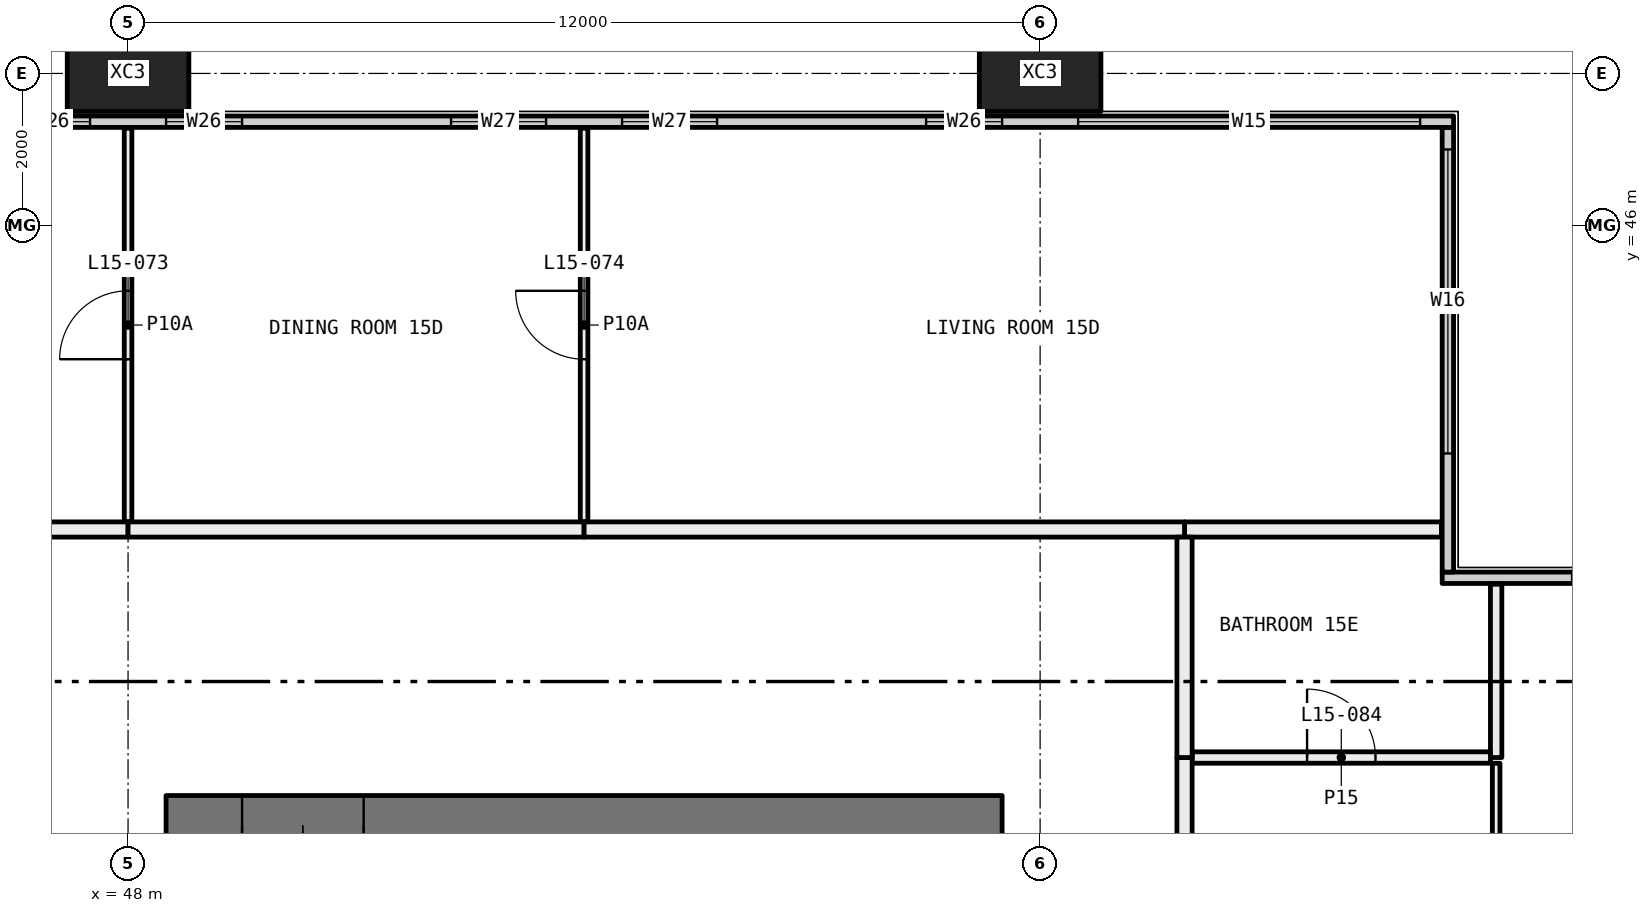
"""IFC4 building model, lengths in metres.
Left out: names, types, materials, properties, quantities, classifications, styles, units other than length and angle.
Written with IfcOpenShell. Run it as: python <this file> out.ifc"""

import sys

from ifc_helpers import new_model, si_unit, direction, frame, frame_2d, origin, origin_2d, place, context, subcontext, project, spatial, rectangle, hollow_rectangle, extrude, element, fill, save


model = new_model("IFC4")
c1 = context("Model", 3, precision=1e-05, world=origin(), true_north=direction((0.0, 1.0)))
c2 = subcontext(c1, "Body", "Model", "MODEL_VIEW")
j1 = project(units=[si_unit("LENGTHUNIT", "METRE"), si_unit("PLANEANGLEUNIT", "RADIAN")], contexts=[c1])
p1 = place(None, origin())
s1 = spatial("IfcSite", under=j1, at=p1, CompositionType="ELEMENT")
p2 = place(p1, origin())
s2 = spatial("IfcBuilding", under=s1, at=p2, CompositionType="ELEMENT")
p3 = place(p2, frame((0.0, 0.0, 64.5)))
s3 = spatial("IfcBuildingStorey", under=s2, at=p3, CompositionType="ELEMENT", Elevation=64.5)
for number, where, z_axis, x_axis in (
    (1, (48.0, 48.0, -0.4), (0.0, 0.0, 1.0), (1.0, 0.0, 0.0)),
    (2, (60.0, 48.0, -0.4), (0.0, 0.0, 1.0), (1.0, 0.0, 0.0)),
):
    element("IfcColumn", number, at=place(p3, frame(where, z_axis=z_axis, x_axis=x_axis)), inside=s3, PredefinedType="COLUMN", context=c2, shape_type="SweptSolid", body=[
        extrude(hollow_rectangle(XDim=1.6, YDim=1.0, WallThickness=0.065, at=origin_2d()), origin(), (0.0, 0.0, 1.0), 3.45),
    ])
p4 = place(p3, frame((65.29, 41.365, 0.0), z_axis=(0.0, 0.0, 1.0), x_axis=(1.0, 0.0, 0.0)))
e3 = element("IfcWall", 3, at=p4, inside=s3, PredefinedType="ELEMENTEDWALL", context=c2, shape_type="SweptSolid", body=[
    extrude(rectangle(XDim=6.15, YDim=0.15, at=frame_2d((3.075, 0.0))), origin(), (0.0, 0.0, 1.0), 3.05),
])
p5 = place(p4, frame((1.71, 0.0, 0.45)))
e4 = element("IfcOpeningElement", 4, at=p5, cuts=e3, PredefinedType="OPENING", context=c2, shape_type="SweptSolid", body=[
    extrude(rectangle(XDim=4.0, YDim=2.55, at=frame_2d((2.0, 1.275))), frame((0.0, 0.085, 0.0), z_axis=(0.0, -1.0, 0.0), x_axis=(1.0, 0.0, 0.0)), (0.0, 0.0, 1.0), 0.17),
])
p6 = place(p3, frame((65.365, 41.44, 0.0), z_axis=(0.0, 0.0, 1.0), x_axis=(0.0, 1.0, 0.0)))
e5 = element("IfcWall", 5, at=p6, inside=s3, PredefinedType="ELEMENTEDWALL", context=c2, shape_type="SweptSolid", body=[
    extrude(rectangle(XDim=5.85, YDim=0.15, at=frame_2d((2.925, 0.0))), origin(), (0.0, 0.0, 1.0), 3.05),
])
p7 = place(p6, frame((1.56, 0.0, 0.45)))
e6 = element("IfcOpeningElement", 6, at=p7, cuts=e5, PredefinedType="OPENING", context=c2, shape_type="SweptSolid", body=[
    extrude(rectangle(XDim=4.0, YDim=2.55, at=frame_2d((2.0, 1.275))), frame((0.0, 0.085, 0.0), z_axis=(0.0, -1.0, 0.0), x_axis=(1.0, 0.0, 0.0)), (0.0, 0.0, 1.0), 0.17),
])
p8 = place(p3, frame((6.56, 47.365, 0.0), z_axis=(0.0, 0.0, 1.0), x_axis=(1.0, 0.0, 0.0)))
e7 = element("IfcWall", 7, at=p8, inside=s3, PredefinedType="ELEMENTEDWALL", context=c2, shape_type="SweptSolid", body=[
    extrude(rectangle(XDim=58.88, YDim=0.15, at=frame_2d((29.44, 0.0))), origin(), (0.0, 0.0, 1.0), 3.05),
])
p9 = place(p8, frame((0.44, 0.0, 0.45)))
e8 = element("IfcOpeningElement", 8, at=p9, cuts=e7, PredefinedType="OPENING", context=c2, shape_type="SweptSolid", body=[
    extrude(rectangle(XDim=4.5, YDim=2.55, at=frame_2d((2.25, 1.275))), frame((0.0, 0.085, 0.0), z_axis=(0.0, -1.0, 0.0), x_axis=(1.0, 0.0, 0.0)), (0.0, 0.0, 1.0), 0.17),
])
p10 = place(p8, frame((5.94, 0.0, 0.45)))
e9 = element("IfcOpeningElement", 9, at=p10, cuts=e7, PredefinedType="OPENING", context=c2, shape_type="SweptSolid", body=[
    extrude(rectangle(XDim=1.0, YDim=2.55, at=frame_2d((0.5, 1.275))), frame((0.0, 0.085, 0.0), z_axis=(0.0, -1.0, 0.0), x_axis=(1.0, 0.0, 0.0)), (0.0, 0.0, 1.0), 0.17),
])
p11 = place(p8, frame((9.69, 0.0, 0.45)))
e10 = element("IfcOpeningElement", 10, at=p11, cuts=e7, PredefinedType="OPENING", context=c2, shape_type="SweptSolid", body=[
    extrude(rectangle(XDim=1.25, YDim=2.55, at=frame_2d((0.625, 1.275))), frame((0.0, 0.085, 0.0), z_axis=(0.0, -1.0, 0.0), x_axis=(1.0, 0.0, 0.0)), (0.0, 0.0, 1.0), 0.17),
])
p12 = place(p8, frame((11.94, 0.0, 0.45)))
e11 = element("IfcOpeningElement", 11, at=p12, cuts=e7, PredefinedType="OPENING", context=c2, shape_type="SweptSolid", body=[
    extrude(rectangle(XDim=1.25, YDim=2.55, at=frame_2d((0.625, 1.275))), frame((0.0, 0.085, 0.0), z_axis=(0.0, -1.0, 0.0), x_axis=(1.0, 0.0, 0.0)), (0.0, 0.0, 1.0), 0.17),
])
p13 = place(p8, frame((15.94, 0.0, 0.45)))
e12 = element("IfcOpeningElement", 12, at=p13, cuts=e7, PredefinedType="OPENING", context=c2, shape_type="SweptSolid", body=[
    extrude(rectangle(XDim=1.0, YDim=2.55, at=frame_2d((0.5, 1.275))), frame((0.0, 0.085, 0.0), z_axis=(0.0, -1.0, 0.0), x_axis=(1.0, 0.0, 0.0)), (0.0, 0.0, 1.0), 0.17),
])
p14 = place(p8, frame((17.94, 0.0, 0.45)))
e13 = element("IfcOpeningElement", 13, at=p14, cuts=e7, PredefinedType="OPENING", context=c2, shape_type="SweptSolid", body=[
    extrude(rectangle(XDim=1.0, YDim=2.55, at=frame_2d((0.5, 1.275))), frame((0.0, 0.085, 0.0), z_axis=(0.0, -1.0, 0.0), x_axis=(1.0, 0.0, 0.0)), (0.0, 0.0, 1.0), 0.17),
])
p15 = place(p8, frame((21.69, 0.0, 0.45)))
e14 = element("IfcOpeningElement", 14, at=p15, cuts=e7, PredefinedType="OPENING", context=c2, shape_type="SweptSolid", body=[
    extrude(rectangle(XDim=1.25, YDim=2.55, at=frame_2d((0.625, 1.275))), frame((0.0, 0.085, 0.0), z_axis=(0.0, -1.0, 0.0), x_axis=(1.0, 0.0, 0.0)), (0.0, 0.0, 1.0), 0.17),
])
p16 = place(p8, frame((23.94, 0.0, 0.45)))
e15 = element("IfcOpeningElement", 15, at=p16, cuts=e7, PredefinedType="OPENING", context=c2, shape_type="SweptSolid", body=[
    extrude(rectangle(XDim=1.25, YDim=2.55, at=frame_2d((0.625, 1.275))), frame((0.0, 0.085, 0.0), z_axis=(0.0, -1.0, 0.0), x_axis=(1.0, 0.0, 0.0)), (0.0, 0.0, 1.0), 0.17),
])
p17 = place(p8, frame((27.94, 0.0, 0.45)))
e16 = element("IfcOpeningElement", 16, at=p17, cuts=e7, PredefinedType="OPENING", context=c2, shape_type="SweptSolid", body=[
    extrude(rectangle(XDim=1.0, YDim=2.55, at=frame_2d((0.5, 1.275))), frame((0.0, 0.085, 0.0), z_axis=(0.0, -1.0, 0.0), x_axis=(1.0, 0.0, 0.0)), (0.0, 0.0, 1.0), 0.17),
])
p18 = place(p8, frame((29.94, 0.0, 0.45)))
e17 = element("IfcOpeningElement", 17, at=p18, cuts=e7, PredefinedType="OPENING", context=c2, shape_type="SweptSolid", body=[
    extrude(rectangle(XDim=1.0, YDim=2.55, at=frame_2d((0.5, 1.275))), frame((0.0, 0.085, 0.0), z_axis=(0.0, -1.0, 0.0), x_axis=(1.0, 0.0, 0.0)), (0.0, 0.0, 1.0), 0.17),
])
p19 = place(p8, frame((33.69, 0.0, 0.45)))
e18 = element("IfcOpeningElement", 18, at=p19, cuts=e7, PredefinedType="OPENING", context=c2, shape_type="SweptSolid", body=[
    extrude(rectangle(XDim=1.25, YDim=2.55, at=frame_2d((0.625, 1.275))), frame((0.0, 0.085, 0.0), z_axis=(0.0, -1.0, 0.0), x_axis=(1.0, 0.0, 0.0)), (0.0, 0.0, 1.0), 0.17),
])
p20 = place(p8, frame((35.94, 0.0, 0.45)))
e19 = element("IfcOpeningElement", 19, at=p20, cuts=e7, PredefinedType="OPENING", context=c2, shape_type="SweptSolid", body=[
    extrude(rectangle(XDim=1.25, YDim=2.55, at=frame_2d((0.625, 1.275))), frame((0.0, 0.085, 0.0), z_axis=(0.0, -1.0, 0.0), x_axis=(1.0, 0.0, 0.0)), (0.0, 0.0, 1.0), 0.17),
])
p21 = place(p8, frame((39.94, 0.0, 0.45)))
e20 = element("IfcOpeningElement", 20, at=p21, cuts=e7, PredefinedType="OPENING", context=c2, shape_type="SweptSolid", body=[
    extrude(rectangle(XDim=1.0, YDim=2.55, at=frame_2d((0.5, 1.275))), frame((0.0, 0.085, 0.0), z_axis=(0.0, -1.0, 0.0), x_axis=(1.0, 0.0, 0.0)), (0.0, 0.0, 1.0), 0.17),
])
p22 = place(p8, frame((41.94, 0.0, 0.45)))
e21 = element("IfcOpeningElement", 21, at=p22, cuts=e7, PredefinedType="OPENING", context=c2, shape_type="SweptSolid", body=[
    extrude(rectangle(XDim=1.0, YDim=2.55, at=frame_2d((0.5, 1.275))), frame((0.0, 0.085, 0.0), z_axis=(0.0, -1.0, 0.0), x_axis=(1.0, 0.0, 0.0)), (0.0, 0.0, 1.0), 0.17),
])
p23 = place(p8, frame((45.69, 0.0, 0.45)))
e22 = element("IfcOpeningElement", 22, at=p23, cuts=e7, PredefinedType="OPENING", context=c2, shape_type="SweptSolid", body=[
    extrude(rectangle(XDim=1.25, YDim=2.55, at=frame_2d((0.625, 1.275))), frame((0.0, 0.085, 0.0), z_axis=(0.0, -1.0, 0.0), x_axis=(1.0, 0.0, 0.0)), (0.0, 0.0, 1.0), 0.17),
])
p24 = place(p8, frame((47.94, 0.0, 0.45)))
e23 = element("IfcOpeningElement", 23, at=p24, cuts=e7, PredefinedType="OPENING", context=c2, shape_type="SweptSolid", body=[
    extrude(rectangle(XDim=1.25, YDim=2.55, at=frame_2d((0.625, 1.275))), frame((0.0, 0.085, 0.0), z_axis=(0.0, -1.0, 0.0), x_axis=(1.0, 0.0, 0.0)), (0.0, 0.0, 1.0), 0.17),
])
p25 = place(p8, frame((51.94, 0.0, 0.45)))
e24 = element("IfcOpeningElement", 24, at=p25, cuts=e7, PredefinedType="OPENING", context=c2, shape_type="SweptSolid", body=[
    extrude(rectangle(XDim=1.0, YDim=2.55, at=frame_2d((0.5, 1.275))), frame((0.0, 0.085, 0.0), z_axis=(0.0, -1.0, 0.0), x_axis=(1.0, 0.0, 0.0)), (0.0, 0.0, 1.0), 0.17),
])
p26 = place(p8, frame((53.94, 0.0, 0.45)))
e25 = element("IfcOpeningElement", 25, at=p26, cuts=e7, PredefinedType="OPENING", context=c2, shape_type="SweptSolid", body=[
    extrude(rectangle(XDim=4.5, YDim=2.55, at=frame_2d((2.25, 1.275))), frame((0.0, 0.085, 0.0), z_axis=(0.0, -1.0, 0.0), x_axis=(1.0, 0.0, 0.0)), (0.0, 0.0, 1.0), 0.17),
])
p27 = place(p3, frame((48.0, 42.1, 0.0), z_axis=(0.0, 0.0, 1.0), x_axis=(0.0, 1.0, 0.0)))
e26 = element("IfcWall", 26, at=p27, inside=s3, PredefinedType="PARTITIONING", context=c2, shape_type="SweptSolid", body=[
    extrude(rectangle(XDim=5.18, YDim=0.1, at=frame_2d((2.59, 0.0))), origin(), (0.0, 0.0, 1.0), 3.05),
])
p28 = place(p27, frame((2.14, 0.0, 0.0)))
e27 = element("IfcOpeningElement", 27, at=p28, cuts=e26, PredefinedType="OPENING", context=c2, shape_type="SweptSolid", body=[
    extrude(rectangle(XDim=0.9, YDim=2.1, at=frame_2d((0.45, 1.05))), frame((0.0, 0.06, 0.0), z_axis=(0.0, -1.0, 0.0), x_axis=(1.0, 0.0, 0.0)), (0.0, 0.0, 1.0), 0.12),
])
p29 = place(p3, frame((46.1, 42.0, 0.0), z_axis=(0.0, 0.0, 1.0), x_axis=(1.0, 0.0, 0.0)))
e28 = element("IfcWall", 28, at=p29, inside=s3, PredefinedType="PARTITIONING", context=c2, shape_type="SweptSolid", body=[
    extrude(rectangle(XDim=1.9, YDim=0.2, at=frame_2d((0.95, 0.0))), origin(), (0.0, 0.0, 1.0), 3.05),
])
p30 = place(p3, frame((54.0, 42.1, 0.0), z_axis=(0.0, 0.0, 1.0), x_axis=(0.0, 1.0, 0.0)))
e29 = element("IfcWall", 29, at=p30, inside=s3, PredefinedType="PARTITIONING", context=c2, shape_type="SweptSolid", body=[
    extrude(rectangle(XDim=5.18, YDim=0.1, at=frame_2d((2.59, 0.0))), origin(), (0.0, 0.0, 1.0), 3.05),
])
p31 = place(p30, frame((2.14, 0.0, 0.0)))
e30 = element("IfcOpeningElement", 30, at=p31, cuts=e29, PredefinedType="OPENING", context=c2, shape_type="SweptSolid", body=[
    extrude(rectangle(XDim=0.9, YDim=2.1, at=frame_2d((0.45, 1.05))), frame((0.0, 0.06, 0.0), z_axis=(0.0, -1.0, 0.0), x_axis=(1.0, 0.0, 0.0)), (0.0, 0.0, 1.0), 0.12),
])
p32 = place(p3, frame((48.0, 42.0, 0.0), z_axis=(0.0, 0.0, 1.0), x_axis=(1.0, 0.0, 0.0)))
e31 = element("IfcWall", 31, at=p32, inside=s3, PredefinedType="PARTITIONING", context=c2, shape_type="SweptSolid", body=[
    extrude(rectangle(XDim=6.0, YDim=0.2, at=frame_2d((3.0, 0.0))), origin(), (0.0, 0.0, 1.0), 3.05),
])
p33 = place(p3, frame((61.9, 42.0, 0.0), z_axis=(0.0, 0.0, 1.0), x_axis=(1.0, 0.0, 0.0)))
e32 = element("IfcWall", 32, at=p33, inside=s3, PredefinedType="PARTITIONING", context=c2, shape_type="SweptSolid", body=[
    extrude(rectangle(XDim=3.38, YDim=0.2, at=frame_2d((1.69, 0.0))), origin(), (0.0, 0.0, 1.0), 3.05),
])
p34 = place(p3, frame((54.0, 42.0, 0.0), z_axis=(0.0, 0.0, 1.0), x_axis=(1.0, 0.0, 0.0)))
e33 = element("IfcWall", 33, at=p34, inside=s3, PredefinedType="PARTITIONING", context=c2, shape_type="SweptSolid", body=[
    extrude(rectangle(XDim=7.9, YDim=0.2, at=frame_2d((3.95, 0.0))), origin(), (0.0, 0.0, 1.0), 3.05),
])
p35 = place(p3, frame((66.0, 38.925, 0.0), z_axis=(0.0, 0.0, 1.0), x_axis=(0.0, -1.0, 0.0)))
e34 = element("IfcWall", 34, at=p35, inside=s3, PredefinedType="PARTITIONING", context=c2, shape_type="SweptSolid", body=[
    extrude(rectangle(XDim=3.025, YDim=0.1, at=frame_2d((1.513, 0.0))), origin(), (0.0, 0.0, 1.0), 2.45),
])
p36 = place(p3, frame((66.0, 41.28, 0.0), z_axis=(0.0, 0.0, 1.0), x_axis=(0.0, -1.0, 0.0)))
e35 = element("IfcWall", 35, at=p36, inside=s3, PredefinedType="PARTITIONING", context=c2, shape_type="SweptSolid", body=[
    extrude(rectangle(XDim=2.28, YDim=0.15, at=frame_2d((1.14, 0.0))), origin(), (0.0, 0.0, 1.0), 3.05),
])
p37 = place(p3, frame((65.925, 39.0, 0.0), z_axis=(0.0, 0.0, 1.0), x_axis=(-1.0, 0.0, 0.0)))
e36 = element("IfcWall", 36, at=p37, inside=s3, PredefinedType="PARTITIONING", context=c2, shape_type="SweptSolid", body=[
    extrude(rectangle(XDim=3.925, YDim=0.15, at=frame_2d((1.962, 0.0))), origin(), (0.0, 0.0, 1.0), 3.05),
])
p38 = place(p37, frame((1.512, 0.0, 0.0)))
e37 = element("IfcOpeningElement", 37, at=p38, cuts=e36, PredefinedType="OPENING", context=c2, shape_type="SweptSolid", body=[
    extrude(rectangle(XDim=0.9, YDim=2.1, at=frame_2d((0.45, 1.05))), frame((0.0, 0.085, 0.0), z_axis=(0.0, -1.0, 0.0), x_axis=(1.0, 0.0, 0.0)), (0.0, 0.0, 1.0), 0.17),
])
p39 = place(p3, frame((61.9, 39.0, 0.0), z_axis=(0.0, 0.0, 1.0), x_axis=(0.0, -1.0, 0.0)))
e38 = element("IfcWall", 38, at=p39, inside=s3, PredefinedType="PARTITIONING", context=c2, shape_type="SweptSolid", body=[
    extrude(rectangle(XDim=3.1, YDim=0.2, at=frame_2d((1.55, 0.0))), origin(), (0.0, 0.0, 1.0), 2.45),
])
p40 = place(p3, frame((61.9, 41.9, 0.0), z_axis=(0.0, 0.0, 1.0), x_axis=(0.0, -1.0, 0.0)))
e39 = element("IfcWall", 39, at=p40, inside=s3, PredefinedType="PARTITIONING", context=c2, shape_type="SweptSolid", body=[
    extrude(rectangle(XDim=2.9, YDim=0.2, at=frame_2d((1.45, 0.0))), origin(), (0.0, 0.0, 1.0), 3.05),
])
p41 = place(p3, frame((59.5, 38.1, 0.0), z_axis=(0.0, 0.0, 1.0), x_axis=(-1.0, 0.0, 0.0)))
e40 = element("IfcWall", 40, at=p41, inside=s3, PredefinedType="SHEAR", context=c2, shape_type="SweptSolid", body=[
    extrude(rectangle(XDim=11.0, YDim=0.8, at=frame_2d((5.5, 0.0))), origin(), (0.0, 0.0, 1.0), 3.05),
])
p42 = place(p41, frame((8.4, 0.0, 0.0)))
e41 = element("IfcOpeningElement", 41, at=p42, cuts=e40, PredefinedType="OPENING", context=c2, shape_type="SweptSolid", body=[
    extrude(rectangle(XDim=1.6, YDim=2.1, at=frame_2d((0.8, 1.05))), frame((0.0, 0.41, 0.0), z_axis=(0.0, -1.0, 0.0), x_axis=(1.0, 0.0, 0.0)), (0.0, 0.0, 1.0), 0.82),
])
p43 = place(p7, origin())
e42 = element("IfcWindow", 42, at=p43, inside=s3, PartitioningType="SINGLE_PANEL", PredefinedType="WINDOW", context=c2, shape_type="SweptSolid", body=[
    extrude(rectangle(XDim=4.0, YDim=2.55, at=frame_2d((2.0, 1.275))), frame((0.0, 0.03, 0.0), z_axis=(0.0, -1.0, 0.0), x_axis=(1.0, 0.0, 0.0)), (0.0, 0.0, 1.0), 0.06),
])
fill(e6, e42)
p44 = place(p21, origin())
e43 = element("IfcWindow", 43, at=p44, inside=s3, PartitioningType="SINGLE_PANEL", PredefinedType="WINDOW", context=c2, shape_type="SweptSolid", body=[
    extrude(rectangle(XDim=1.0, YDim=2.55, at=frame_2d((0.5, 1.275))), frame((0.0, 0.03, 0.0), z_axis=(0.0, -1.0, 0.0), x_axis=(1.0, 0.0, 0.0)), (0.0, 0.0, 1.0), 0.06),
])
fill(e20, e43)
p45 = place(p22, origin())
e44 = element("IfcWindow", 44, at=p45, inside=s3, PartitioningType="SINGLE_PANEL", PredefinedType="WINDOW", context=c2, shape_type="SweptSolid", body=[
    extrude(rectangle(XDim=1.0, YDim=2.55, at=frame_2d((0.5, 1.275))), frame((0.0, 0.03, 0.0), z_axis=(0.0, -1.0, 0.0), x_axis=(1.0, 0.0, 0.0)), (0.0, 0.0, 1.0), 0.06),
])
fill(e21, e44)
p46 = place(p23, origin())
e45 = element("IfcWindow", 45, at=p46, inside=s3, PartitioningType="SINGLE_PANEL", PredefinedType="WINDOW", context=c2, shape_type="SweptSolid", body=[
    extrude(rectangle(XDim=1.25, YDim=2.55, at=frame_2d((0.625, 1.275))), frame((0.0, 0.03, 0.0), z_axis=(0.0, -1.0, 0.0), x_axis=(1.0, 0.0, 0.0)), (0.0, 0.0, 1.0), 0.06),
])
fill(e22, e45)
p47 = place(p24, origin())
e46 = element("IfcWindow", 46, at=p47, inside=s3, PartitioningType="SINGLE_PANEL", PredefinedType="WINDOW", context=c2, shape_type="SweptSolid", body=[
    extrude(rectangle(XDim=1.25, YDim=2.55, at=frame_2d((0.625, 1.275))), frame((0.0, 0.03, 0.0), z_axis=(0.0, -1.0, 0.0), x_axis=(1.0, 0.0, 0.0)), (0.0, 0.0, 1.0), 0.06),
])
fill(e23, e46)
p48 = place(p25, origin())
e47 = element("IfcWindow", 47, at=p48, inside=s3, PartitioningType="SINGLE_PANEL", PredefinedType="WINDOW", context=c2, shape_type="SweptSolid", body=[
    extrude(rectangle(XDim=1.0, YDim=2.55, at=frame_2d((0.5, 1.275))), frame((0.0, 0.03, 0.0), z_axis=(0.0, -1.0, 0.0), x_axis=(1.0, 0.0, 0.0)), (0.0, 0.0, 1.0), 0.06),
])
fill(e24, e47)
p49 = place(p26, origin())
e48 = element("IfcWindow", 48, at=p49, inside=s3, PartitioningType="SINGLE_PANEL", PredefinedType="WINDOW", context=c2, shape_type="SweptSolid", body=[
    extrude(rectangle(XDim=4.5, YDim=2.55, at=frame_2d((2.25, 1.275))), frame((0.0, 0.03, 0.0), z_axis=(0.0, -1.0, 0.0), x_axis=(1.0, 0.0, 0.0)), (0.0, 0.0, 1.0), 0.06),
])
fill(e25, e48)
p50 = place(p28, origin())
e49 = element("IfcDoor", 49, at=p50, inside=s3, OperationType="SINGLE_SWING_RIGHT", PredefinedType="DOOR", context=c2, shape_type="SweptSolid", body=[
    extrude(rectangle(XDim=0.9, YDim=2.1, at=frame_2d((0.45, 1.05))), frame((0.0, 0.025, 0.0), z_axis=(0.0, -1.0, 0.0), x_axis=(1.0, 0.0, 0.0)), (0.0, 0.0, 1.0), 0.05),
])
fill(e27, e49)
p51 = place(p31, origin())
e50 = element("IfcDoor", 50, at=p51, inside=s3, OperationType="SINGLE_SWING_LEFT", PredefinedType="DOOR", context=c2, shape_type="SweptSolid", body=[
    extrude(rectangle(XDim=0.9, YDim=2.1, at=frame_2d((0.45, 1.05))), frame((0.0, 0.025, 0.0), z_axis=(0.0, -1.0, 0.0), x_axis=(1.0, 0.0, 0.0)), (0.0, 0.0, 1.0), 0.05),
])
fill(e30, e50)
p52 = place(p38, frame((0.9, 0.0, 0.0), x_axis=(-1.0, 0.0, 0.0)))
e51 = element("IfcDoor", 51, at=p52, inside=s3, OperationType="SINGLE_SWING_RIGHT", PredefinedType="DOOR", context=c2, shape_type="SweptSolid", body=[
    extrude(rectangle(XDim=0.9, YDim=2.1, at=frame_2d((0.45, 1.05))), frame((0.0, 0.025, 0.0), z_axis=(0.0, -1.0, 0.0), x_axis=(1.0, 0.0, 0.0)), (0.0, 0.0, 1.0), 0.05),
])
fill(e37, e51)
p53 = place(p42, origin())
e52 = element("IfcDoor", 52, at=p53, inside=s3, OperationType="DOUBLE_DOOR_SINGLE_SWING", PredefinedType="DOOR", context=c2, shape_type="SweptSolid", body=[
    extrude(rectangle(XDim=1.6, YDim=2.1, at=frame_2d((0.8, 1.05))), frame((0.0, 0.025, 0.0), z_axis=(0.0, -1.0, 0.0), x_axis=(1.0, 0.0, 0.0)), (0.0, 0.0, 1.0), 0.05),
])
fill(e41, e52)
save(model, sys.argv[1])
